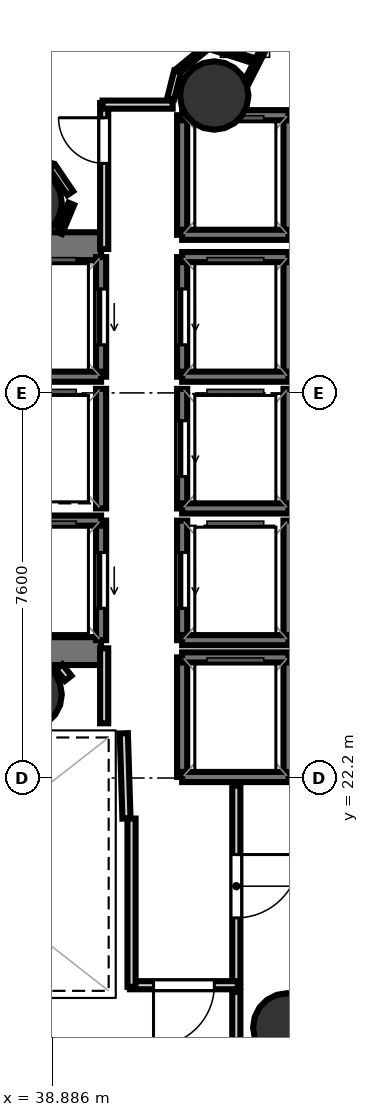
"""IFC4 building model, lengths in metres.
Left out: names, types, materials, properties, quantities, classifications, styles, units other than length and angle.
Written with IfcOpenShell. Run it as: python <this file> out.ifc"""

import sys

from ifc_helpers import new_model, si_unit, direction, frame, frame_2d, origin, origin_2d, place, context, subcontext, project, spatial, rectangle, hollow_circle, extrude, element, fill, save


model = new_model("IFC4")
c1 = context("Model", 3, precision=1e-05, world=origin(), true_north=direction((0.0, 1.0)))
c2 = subcontext(c1, "Body", "Model", "MODEL_VIEW")
j1 = project(units=[si_unit("LENGTHUNIT", "METRE"), si_unit("PLANEANGLEUNIT", "RADIAN")], contexts=[c1])
p1 = place(None, origin())
s1 = spatial("IfcSite", under=j1, at=p1, CompositionType="ELEMENT")
p2 = place(p1, origin())
s2 = spatial("IfcBuilding", under=s1, at=p2, CompositionType="ELEMENT")
p3 = place(p2, frame((0.0, 0.0, 173.5)))
s3 = spatial("IfcBuildingStorey", under=s2, at=p3, CompositionType="ELEMENT", Elevation=173.5)
p4 = place(p3, frame((29.23, 32.695, 0.0), z_axis=(0.0, 0.0, 1.0), x_axis=(1.0, 0.0, 0.0)))
e1 = element("IfcWall", 1, at=p4, inside=s3, PredefinedType="SHEAR", context=c2, shape_type="SweptSolid", body=[
    extrude(rectangle(XDim=10.62, YDim=0.55, at=frame_2d((5.31, 0.0))), origin(), (0.0, 0.0, 1.0), 3.52),
])
p5 = place(p4, frame((0.995, 0.0, 0.0)))
e2 = element("IfcOpeningElement", 2, at=p5, cuts=e1, PredefinedType="OPENING", context=c2, shape_type="SweptSolid", body=[
    extrude(rectangle(XDim=1.25, YDim=2.15, at=frame_2d((0.625, 1.075))), frame((0.0, 0.285, 0.0), z_axis=(0.0, -1.0, 0.0), x_axis=(1.0, 0.0, 0.0)), (0.0, 0.0, 1.0), 0.57),
])
p6 = place(p3, frame((29.23, 24.705, 0.0), z_axis=(0.0, 0.0, 1.0), x_axis=(1.0, 0.0, 0.0)))
e3 = element("IfcWall", 3, at=p6, inside=s3, PredefinedType="SHEAR", context=c2, shape_type="SweptSolid", body=[
    extrude(rectangle(XDim=10.62, YDim=0.55, at=frame_2d((5.31, 0.0))), origin(), (0.0, 0.0, 1.0), 3.52),
])
p7 = place(p6, frame((0.795, 0.0, 0.0)))
e4 = element("IfcOpeningElement", 4, at=p7, cuts=e3, PredefinedType="OPENING", context=c2, shape_type="SweptSolid", body=[
    extrude(rectangle(XDim=1.25, YDim=2.15, at=frame_2d((0.625, 1.075))), frame((0.0, 0.285, 0.0), z_axis=(0.0, -1.0, 0.0), x_axis=(1.0, 0.0, 0.0)), (0.0, 0.0, 1.0), 0.57),
])
for number, where, z_axis, x_axis in (
    (5, (38.4, 33.55, 0.0), (0.0, 0.0, 1.0), (1.0, 0.0, 0.0)),
    (6, (38.4, 23.85, 0.0), (0.0, 0.0, 1.0), (1.0, 0.0, 0.0)),
    (7, (42.083, 35.669, 0.0), (0.0, 0.0, 1.0), (1.0, 0.0, 0.0)),
    (8, (43.525, 17.279, 0.0), (0.0, 0.0, 1.0), (1.0, 0.0, 0.0)),
):
    element("IfcColumn", number, at=place(p3, frame(where, z_axis=z_axis, x_axis=x_axis)), inside=s3, PredefinedType="COLUMN", context=c2, shape_type="SweptSolid", body=[
        extrude(hollow_circle(Radius=0.675, WallThickness=0.032, at=origin_2d()), origin(), (0.0, 0.0, 1.0), 3.7),
    ])
p8 = place(p3, frame((39.85, 30.12, 0.0), z_axis=(0.0, 0.0, 1.0), x_axis=(0.0, 1.0, 0.0)))
e9 = element("IfcWall", 9, at=p8, inside=s3, PredefinedType="SOLIDWALL", context=c2, shape_type="SweptSolid", body=[
    extrude(rectangle(XDim=2.36, YDim=0.2, at=frame_2d((1.18, 0.0))), origin(), (0.0, 0.0, 1.0), 3.52),
])
p9 = place(p8, frame((0.63, 0.0, 0.0)))
e10 = element("IfcOpeningElement", 10, at=p9, cuts=e9, PredefinedType="OPENING", context=c2, shape_type="SweptSolid", body=[
    extrude(rectangle(XDim=1.1, YDim=2.15, at=frame_2d((0.55, 1.075))), frame((0.0, 0.11, 0.0), z_axis=(0.0, -1.0, 0.0), x_axis=(1.0, 0.0, 0.0)), (0.0, 0.0, 1.0), 0.22),
])
p10 = place(p3, frame((37.75, 30.12, 0.0), z_axis=(0.0, 0.0, 1.0), x_axis=(1.0, 0.0, 0.0)))
e11 = element("IfcWall", 11, at=p10, inside=s3, PredefinedType="SOLIDWALL", context=c2, shape_type="SweptSolid", body=[
    extrude(rectangle(XDim=2.1, YDim=0.2, at=frame_2d((1.05, 0.0))), origin(), (0.0, 0.0, 1.0), 3.52),
])
p11 = place(p3, frame((39.85, 24.92, 0.0), z_axis=(0.0, 0.0, 1.0), x_axis=(0.0, 1.0, 0.0)))
e12 = element("IfcWall", 12, at=p11, inside=s3, PredefinedType="SOLIDWALL", context=c2, shape_type="SweptSolid", body=[
    extrude(rectangle(XDim=2.36, YDim=0.2, at=frame_2d((1.18, 0.0))), origin(), (0.0, 0.0, 1.0), 3.52),
])
p12 = place(p11, frame((0.63, 0.0, 0.0)))
e13 = element("IfcOpeningElement", 13, at=p12, cuts=e12, PredefinedType="OPENING", context=c2, shape_type="SweptSolid", body=[
    extrude(rectangle(XDim=1.1, YDim=2.15, at=frame_2d((0.55, 1.075))), frame((0.0, 0.11, 0.0), z_axis=(0.0, -1.0, 0.0), x_axis=(1.0, 0.0, 0.0)), (0.0, 0.0, 1.0), 0.22),
])
p13 = place(p3, frame((37.75, 27.28, 0.0), z_axis=(0.0, 0.0, 1.0), x_axis=(1.0, 0.0, 0.0)))
e14 = element("IfcWall", 14, at=p13, inside=s3, PredefinedType="SOLIDWALL", context=c2, shape_type="SweptSolid", body=[
    extrude(rectangle(XDim=2.1, YDim=0.2, at=frame_2d((1.05, 0.0))), origin(), (0.0, 0.0, 1.0), 3.52),
])
p14 = place(p3, frame((43.55, 30.12, 0.0), z_axis=(0.0, 0.0, 1.0), x_axis=(0.0, 1.0, 0.0)))
e15 = element("IfcWall", 15, at=p14, inside=s3, PredefinedType="SOLIDWALL", context=c2, shape_type="SweptSolid", body=[
    extrude(rectangle(XDim=2.36, YDim=0.2, at=frame_2d((1.18, 0.0))), origin(), (0.0, 0.0, 1.0), 3.52),
])
p15 = place(p3, frame((41.45, 30.12, 0.0), z_axis=(0.0, 0.0, 1.0), x_axis=(0.0, 1.0, 0.0)))
e16 = element("IfcWall", 16, at=p15, inside=s3, PredefinedType="SOLIDWALL", context=c2, shape_type="SweptSolid", body=[
    extrude(rectangle(XDim=2.36, YDim=0.2, at=frame_2d((1.18, 0.0))), origin(), (0.0, 0.0, 1.0), 3.52),
])
p16 = place(p15, frame((0.63, 0.0, 0.0)))
e17 = element("IfcOpeningElement", 17, at=p16, cuts=e16, PredefinedType="OPENING", context=c2, shape_type="SweptSolid", body=[
    extrude(rectangle(XDim=1.1, YDim=2.15, at=frame_2d((0.55, 1.075))), frame((0.0, 0.11, 0.0), z_axis=(0.0, -1.0, 0.0), x_axis=(1.0, 0.0, 0.0)), (0.0, 0.0, 1.0), 0.22),
])
for number, where, z_axis, x_axis in (
    (18, (41.45, 32.48, 0.0), (0.0, 0.0, 1.0), (1.0, 0.0, 0.0)),
    (19, (41.45, 30.12, 0.0), (0.0, 0.0, 1.0), (1.0, 0.0, 0.0)),
):
    element("IfcWall", number, at=place(p3, frame(where, z_axis=z_axis, x_axis=x_axis)), inside=s3, PredefinedType="SOLIDWALL", context=c2, shape_type="SweptSolid", body=[
        extrude(rectangle(XDim=2.1, YDim=0.2, at=frame_2d((1.05, 0.0))), origin(), (0.0, 0.0, 1.0), 3.52),
    ])
p17 = place(p3, frame((43.55, 27.52, 0.0), z_axis=(0.0, 0.0, 1.0), x_axis=(0.0, 1.0, 0.0)))
e20 = element("IfcWall", 20, at=p17, inside=s3, PredefinedType="SOLIDWALL", context=c2, shape_type="SweptSolid", body=[
    extrude(rectangle(XDim=2.36, YDim=0.2, at=frame_2d((1.18, 0.0))), origin(), (0.0, 0.0, 1.0), 3.52),
])
p18 = place(p3, frame((41.45, 27.52, 0.0), z_axis=(0.0, 0.0, 1.0), x_axis=(0.0, 1.0, 0.0)))
e21 = element("IfcWall", 21, at=p18, inside=s3, PredefinedType="SOLIDWALL", context=c2, shape_type="SweptSolid", body=[
    extrude(rectangle(XDim=2.36, YDim=0.2, at=frame_2d((1.18, 0.0))), origin(), (0.0, 0.0, 1.0), 3.52),
])
p19 = place(p18, frame((0.63, 0.0, 0.0)))
e22 = element("IfcOpeningElement", 22, at=p19, cuts=e21, PredefinedType="OPENING", context=c2, shape_type="SweptSolid", body=[
    extrude(rectangle(XDim=1.1, YDim=2.15, at=frame_2d((0.55, 1.075))), frame((0.0, 0.11, 0.0), z_axis=(0.0, -1.0, 0.0), x_axis=(1.0, 0.0, 0.0)), (0.0, 0.0, 1.0), 0.22),
])
p20 = place(p3, frame((41.45, 27.52, 0.0), z_axis=(0.0, 0.0, 1.0), x_axis=(1.0, 0.0, 0.0)))
e23 = element("IfcWall", 23, at=p20, inside=s3, PredefinedType="SOLIDWALL", context=c2, shape_type="SweptSolid", body=[
    extrude(rectangle(XDim=2.1, YDim=0.2, at=frame_2d((1.05, 0.0))), origin(), (0.0, 0.0, 1.0), 3.52),
])
p21 = place(p3, frame((43.55, 24.92, 0.0), z_axis=(0.0, 0.0, 1.0), x_axis=(0.0, 1.0, 0.0)))
e24 = element("IfcWall", 24, at=p21, inside=s3, PredefinedType="SOLIDWALL", context=c2, shape_type="SweptSolid", body=[
    extrude(rectangle(XDim=2.36, YDim=0.2, at=frame_2d((1.18, 0.0))), origin(), (0.0, 0.0, 1.0), 3.52),
])
p22 = place(p3, frame((41.45, 24.92, 0.0), z_axis=(0.0, 0.0, 1.0), x_axis=(0.0, 1.0, 0.0)))
e25 = element("IfcWall", 25, at=p22, inside=s3, PredefinedType="SOLIDWALL", context=c2, shape_type="SweptSolid", body=[
    extrude(rectangle(XDim=2.36, YDim=0.2, at=frame_2d((1.18, 0.0))), origin(), (0.0, 0.0, 1.0), 3.52),
])
p23 = place(p22, frame((0.63, 0.0, 0.0)))
e26 = element("IfcOpeningElement", 26, at=p23, cuts=e25, PredefinedType="OPENING", context=c2, shape_type="SweptSolid", body=[
    extrude(rectangle(XDim=1.1, YDim=2.15, at=frame_2d((0.55, 1.075))), frame((0.0, 0.11, 0.0), z_axis=(0.0, -1.0, 0.0), x_axis=(1.0, 0.0, 0.0)), (0.0, 0.0, 1.0), 0.22),
])
p24 = place(p3, frame((41.45, 24.92, 0.0), z_axis=(0.0, 0.0, 1.0), x_axis=(1.0, 0.0, 0.0)))
e27 = element("IfcWall", 27, at=p24, inside=s3, PredefinedType="SOLIDWALL", context=c2, shape_type="SweptSolid", body=[
    extrude(rectangle(XDim=2.1, YDim=0.2, at=frame_2d((1.05, 0.0))), origin(), (0.0, 0.0, 1.0), 3.52),
])
p25 = place(p3, frame((39.85, 27.52, 0.0), z_axis=(0.0, 0.0, 1.0), x_axis=(0.0, 1.0, 0.0)))
e28 = element("IfcWall", 28, at=p25, inside=s3, PredefinedType="SOLIDWALL", context=c2, shape_type="SweptSolid", body=[
    extrude(rectangle(XDim=2.36, YDim=0.2, at=frame_2d((1.18, 0.0))), origin(), (0.0, 0.0, 1.0), 3.52),
])
for number, where, z_axis, x_axis in (
    (29, (43.55, 22.22, 0.0), (0.0, 0.0, 1.0), (0.0, 1.0, 0.0)),
    (30, (41.45, 22.22, 0.0), (0.0, 0.0, 1.0), (0.0, 1.0, 0.0)),
):
    element("IfcWall", number, at=place(p3, frame(where, z_axis=z_axis, x_axis=x_axis)), inside=s3, PredefinedType="SOLIDWALL", context=c2, shape_type="SweptSolid", body=[
        extrude(rectangle(XDim=2.36, YDim=0.2, at=frame_2d((1.18, 0.0))), origin(), (0.0, 0.0, 1.0), 3.52),
    ])
for number, where, z_axis, x_axis in (
    (31, (41.45, 24.58, 0.0), (0.0, 0.0, 1.0), (1.0, 0.0, 0.0)),
    (32, (41.45, 22.22, 0.0), (0.0, 0.0, 1.0), (1.0, 0.0, 0.0)),
):
    element("IfcWall", number, at=place(p3, frame(where, z_axis=z_axis, x_axis=x_axis)), inside=s3, PredefinedType="SOLIDWALL", context=c2, shape_type="SweptSolid", body=[
        extrude(rectangle(XDim=2.1, YDim=0.2, at=frame_2d((1.05, 0.0))), origin(), (0.0, 0.0, 1.0), 3.52),
    ])
for number, where, z_axis, x_axis in (
    (33, (43.55, 32.92, 0.0), (0.0, 0.0, 1.0), (0.0, 1.0, 0.0)),
    (34, (41.45, 32.92, 0.0), (0.0, 0.0, 1.0), (0.0, 1.0, 0.0)),
):
    element("IfcWall", number, at=place(p3, frame(where, z_axis=z_axis, x_axis=x_axis)), inside=s3, PredefinedType="SOLIDWALL", context=c2, shape_type="SweptSolid", body=[
        extrude(rectangle(XDim=2.36, YDim=0.2, at=frame_2d((1.18, 0.0))), origin(), (0.0, 0.0, 1.0), 3.52),
    ])
for number, where, z_axis, x_axis in (
    (35, (41.45, 35.28, 0.0), (0.0, 0.0, 1.0), (1.0, 0.0, 0.0)),
    (36, (41.45, 32.92, 0.0), (0.0, 0.0, 1.0), (1.0, 0.0, 0.0)),
):
    element("IfcWall", number, at=place(p3, frame(where, z_axis=z_axis, x_axis=x_axis)), inside=s3, PredefinedType="SOLIDWALL", context=c2, shape_type="SweptSolid", body=[
        extrude(rectangle(XDim=2.1, YDim=0.2, at=frame_2d((1.05, 0.0))), origin(), (0.0, 0.0, 1.0), 3.52),
    ])
p26 = place(p3, frame((40.351, 21.401, 0.0), z_axis=(0.0, 0.0, 1.0), x_axis=(-0.031058045979, 0.999517582527, 0.0)))
e37 = element("IfcWall", 37, at=p26, inside=s3, PredefinedType="PARTITIONING", context=c2, shape_type="SweptSolid", body=[
    extrude(rectangle(XDim=1.682, YDim=0.16, at=frame_2d((0.841, 0.0))), origin(), (0.0, 0.0, 1.0), 2.84),
])
p27 = place(p3, frame((39.911, 23.28, 0.0), z_axis=(0.0, 0.0, 1.0), x_axis=(0.0, 1.0, 0.0)))
e38 = element("IfcWall", 38, at=p27, inside=s3, PredefinedType="PARTITIONING", context=c2, shape_type="SweptSolid", body=[
    extrude(rectangle(XDim=1.48, YDim=0.16, at=frame_2d((0.74, 0.0))), origin(), (0.0, 0.0, 1.0), 2.84),
])
p28 = place(p3, frame((39.911, 32.64, 0.0), z_axis=(0.0, 0.0, 1.0), x_axis=(0.0, 1.0, 0.0)))
e39 = element("IfcWall", 39, at=p28, inside=s3, PredefinedType="PARTITIONING", context=c2, shape_type="SweptSolid", body=[
    extrude(rectangle(XDim=2.88, YDim=0.16, at=frame_2d((1.44, 0.0))), origin(), (0.0, 0.0, 1.0), 2.84),
])
p29 = place(p28, frame((1.69, 0.0, 0.0)))
e40 = element("IfcOpeningElement", 40, at=p29, cuts=e39, PredefinedType="OPENING", context=c2, shape_type="SweptSolid", body=[
    extrude(rectangle(XDim=0.9, YDim=2.1, at=frame_2d((0.45, 1.05))), frame((0.0, 0.09, 0.0), z_axis=(0.0, -1.0, 0.0), x_axis=(1.0, 0.0, 0.0)), (0.0, 0.0, 1.0), 0.18),
])
p30 = place(p3, frame((39.88, 35.489, 0.0), z_axis=(0.0, 0.0, 1.0), x_axis=(1.0, 0.0, 0.0)))
e41 = element("IfcWall", 41, at=p30, inside=s3, PredefinedType="PARTITIONING", context=c2, shape_type="SweptSolid", body=[
    extrude(rectangle(XDim=1.383, YDim=0.16, at=frame_2d((0.691, 0.0))), origin(), (0.0, 0.0, 1.0), 2.84),
])
p31 = place(p3, frame((42.519, 22.05, 0.0), z_axis=(0.0, 0.0, 1.0), x_axis=(0.0, -1.0, 0.0)))
e42 = element("IfcWall", 42, at=p31, inside=s3, PredefinedType="PARTITIONING", context=c2, shape_type="SweptSolid", body=[
    extrude(rectangle(XDim=3.97, YDim=0.16, at=frame_2d((1.985, 0.0))), origin(), (0.0, 0.0, 1.0), 2.84),
])
p32 = place(p31, frame((1.36, 0.0, 0.0)))
e43 = element("IfcOpeningElement", 43, at=p32, cuts=e42, PredefinedType="OPENING", context=c2, shape_type="SweptSolid", body=[
    extrude(rectangle(XDim=1.25, YDim=2.2, at=frame_2d((0.625, 1.1))), frame((0.0, 0.09, 0.0), z_axis=(0.0, -1.0, 0.0), x_axis=(1.0, 0.0, 0.0)), (0.0, 0.0, 1.0), 0.18),
])
p33 = place(p3, frame((42.55, 18.111, 0.0), z_axis=(0.0, 0.0, 1.0), x_axis=(-1.0, 0.0, 0.0)))
e44 = element("IfcWall", 44, at=p33, inside=s3, PredefinedType="PARTITIONING", context=c2, shape_type="SweptSolid", body=[
    extrude(rectangle(XDim=2.13, YDim=0.16, at=frame_2d((1.065, 0.0))), origin(), (0.0, 0.0, 1.0), 2.84),
])
p34 = place(p33, frame((0.465, 0.0, 0.0)))
e45 = element("IfcOpeningElement", 45, at=p34, cuts=e44, PredefinedType="OPENING", context=c2, shape_type="SweptSolid", body=[
    extrude(rectangle(XDim=1.2, YDim=2.15, at=frame_2d((0.6, 1.075))), frame((0.0, 0.09, 0.0), z_axis=(0.0, -1.0, 0.0), x_axis=(1.0, 0.0, 0.0)), (0.0, 0.0, 1.0), 0.18),
])
p35 = place(p3, frame((40.451, 18.08, 0.0), z_axis=(0.0, 0.0, 1.0), x_axis=(0.0, 1.0, 0.0)))
e46 = element("IfcWall", 46, at=p35, inside=s3, PredefinedType="PARTITIONING", context=c2, shape_type="SweptSolid", body=[
    extrude(rectangle(XDim=3.32, YDim=0.16, at=frame_2d((1.66, 0.0))), origin(), (0.0, 0.0, 1.0), 2.84),
])
p36 = place(p3, frame((39.202, 24.169, 0.0), z_axis=(0.0, 0.0, 1.0), x_axis=(-0.621699046284, 0.783256213413, 0.0)))
e47 = element("IfcWall", 47, at=p36, inside=s3, PredefinedType="PARTITIONING", context=c2, shape_type="SweptSolid", body=[
    extrude(rectangle(XDim=0.289, YDim=0.16, at=frame_2d((0.144, 0.0))), origin(), (0.0, 0.0, 1.0), 2.84),
])
p37 = place(p3, frame((42.519, 17.98, 0.0), z_axis=(0.0, 0.0, 1.0), x_axis=(0.0, -1.0, 0.0)))
e48 = element("IfcWall", 48, at=p37, inside=s3, PredefinedType="PARTITIONING", context=c2, shape_type="SweptSolid", body=[
    extrude(rectangle(XDim=3.042, YDim=0.16, at=frame_2d((1.521, 0.0))), origin(), (0.0, 0.0, 1.0), 2.84),
])
p38 = place(p3, frame((42.462, 35.426, 0.0), z_axis=(0.0, 0.0, 1.0), x_axis=(0.454699955927, 0.890644682284, 0.0)))
e49 = element("IfcWall", 49, at=p38, inside=s3, PredefinedType="PARTITIONING", context=c2, shape_type="SweptSolid", body=[
    extrude(rectangle(XDim=1.601, YDim=0.105, at=frame_2d((0.801, 0.0))), origin(), (0.0, 0.0, 1.0), 2.84),
])
p39 = place(p3, frame((39.241, 33.741, 0.0), z_axis=(0.0, 0.0, 1.0), x_axis=(-0.559619584068, 0.828749613048, 0.0)))
e50 = element("IfcWall", 50, at=p39, inside=s3, PredefinedType="PARTITIONING", context=c2, shape_type="SweptSolid", body=[
    extrude(rectangle(XDim=0.629, YDim=0.14, at=frame_2d((0.314, 0.0))), origin(), (0.0, 0.0, 1.0), 2.84),
])
p40 = place(p3, frame((38.873, 34.274, 0.0), z_axis=(0.0, 0.0, 1.0), x_axis=(-0.956850575764, 0.290580411693, 0.0)))
e51 = element("IfcWall", 51, at=p40, inside=s3, PredefinedType="PARTITIONING", context=c2, shape_type="SweptSolid", body=[
    extrude(rectangle(XDim=0.485, YDim=0.12, at=frame_2d((0.242, 0.0))), origin(), (0.0, 0.0, 1.0), 2.84),
])
p41 = place(p3, frame((39.023, 32.958, 0.0), z_axis=(0.0, 0.0, 1.0), x_axis=(0.385702795868, 0.922623082987, 0.0)))
e52 = element("IfcWall", 52, at=p41, inside=s3, PredefinedType="PARTITIONING", context=c2, shape_type="SweptSolid", body=[
    extrude(rectangle(XDim=0.622, YDim=0.12, at=frame_2d((0.311, 0.0))), origin(), (0.0, 0.0, 1.0), 2.84),
])
p42 = place(p3, frame((37.22, 38.168, 0.0), z_axis=(0.0, 0.0, 1.0), x_axis=(0.952167427944, -0.305576813849, 0.0)))
e53 = element("IfcWall", 53, at=p42, inside=s3, PredefinedType="PARTITIONING", context=c2, shape_type="SweptSolid", body=[
    extrude(rectangle(XDim=5.904, YDim=0.105, at=frame_2d((2.952, 0.0))), origin(), (0.0, 0.0, 1.0), 2.84),
])
p43 = place(p3, frame((42.487, 37.074, 0.0), z_axis=(0.0, 0.0, 1.0), x_axis=(-0.773083984598, -0.634303675504, 0.0)))
e54 = element("IfcWall", 54, at=p43, inside=s3, PredefinedType="PARTITIONING", context=c2, shape_type="SweptSolid", body=[
    extrude(rectangle(XDim=1.446, YDim=0.105, at=frame_2d((0.723, 0.0))), origin(), (0.0, 0.0, 1.0), 2.84),
])
p44 = place(p3, frame((41.359, 36.14, 0.0), z_axis=(0.0, 0.0, 1.0), x_axis=(-0.243371504092, -0.969933147694, 0.0)))
e55 = element("IfcWall", 55, at=p44, inside=s3, PredefinedType="PARTITIONING", context=c2, shape_type="SweptSolid", body=[
    extrude(rectangle(XDim=0.55, YDim=0.14, at=frame_2d((0.275, 0.0))), origin(), (0.0, 0.0, 1.0), 2.84),
])
p45 = place(p9, origin())
e56 = element("IfcDoor", 56, at=p45, inside=s3, OperationType="SLIDING_TO_LEFT", PredefinedType="DOOR", context=c2, shape_type="SweptSolid", body=[
    extrude(rectangle(XDim=1.1, YDim=2.15, at=frame_2d((0.55, 1.075))), frame((0.0, 0.025, 0.0), z_axis=(0.0, -1.0, 0.0), x_axis=(1.0, 0.0, 0.0)), (0.0, 0.0, 1.0), 0.05),
])
fill(e10, e56)
p46 = place(p12, origin())
e57 = element("IfcDoor", 57, at=p46, inside=s3, OperationType="SLIDING_TO_LEFT", PredefinedType="DOOR", context=c2, shape_type="SweptSolid", body=[
    extrude(rectangle(XDim=1.1, YDim=2.15, at=frame_2d((0.55, 1.075))), frame((0.0, 0.025, 0.0), z_axis=(0.0, -1.0, 0.0), x_axis=(1.0, 0.0, 0.0)), (0.0, 0.0, 1.0), 0.05),
])
fill(e13, e57)
p47 = place(p16, origin())
e58 = element("IfcDoor", 58, at=p47, inside=s3, OperationType="SLIDING_TO_LEFT", PredefinedType="DOOR", context=c2, shape_type="SweptSolid", body=[
    extrude(rectangle(XDim=1.1, YDim=2.15, at=frame_2d((0.55, 1.075))), frame((0.0, 0.025, 0.0), z_axis=(0.0, -1.0, 0.0), x_axis=(1.0, 0.0, 0.0)), (0.0, 0.0, 1.0), 0.05),
])
fill(e17, e58)
p48 = place(p19, origin())
e59 = element("IfcDoor", 59, at=p48, inside=s3, OperationType="SLIDING_TO_LEFT", PredefinedType="DOOR", context=c2, shape_type="SweptSolid", body=[
    extrude(rectangle(XDim=1.1, YDim=2.15, at=frame_2d((0.55, 1.075))), frame((0.0, 0.025, 0.0), z_axis=(0.0, -1.0, 0.0), x_axis=(1.0, 0.0, 0.0)), (0.0, 0.0, 1.0), 0.05),
])
fill(e22, e59)
p49 = place(p23, origin())
e60 = element("IfcDoor", 60, at=p49, inside=s3, OperationType="SLIDING_TO_LEFT", PredefinedType="DOOR", context=c2, shape_type="SweptSolid", body=[
    extrude(rectangle(XDim=1.1, YDim=2.15, at=frame_2d((0.55, 1.075))), frame((0.0, 0.025, 0.0), z_axis=(0.0, -1.0, 0.0), x_axis=(1.0, 0.0, 0.0)), (0.0, 0.0, 1.0), 0.05),
])
fill(e26, e60)
p50 = place(p34, origin())
e61 = element("IfcDoor", 61, at=p50, inside=s3, OperationType="SINGLE_SWING_RIGHT", PredefinedType="DOOR", context=c2, shape_type="SweptSolid", body=[
    extrude(rectangle(XDim=1.2, YDim=2.15, at=frame_2d((0.6, 1.075))), frame((0.0, 0.025, 0.0), z_axis=(0.0, -1.0, 0.0), x_axis=(1.0, 0.0, 0.0)), (0.0, 0.0, 1.0), 0.05),
])
fill(e45, e61)
p51 = place(p32, origin())
e62 = element("IfcDoor", 62, at=p51, inside=s3, OperationType="SINGLE_SWING_LEFT", PredefinedType="DOOR", context=c2, shape_type="SweptSolid", body=[
    extrude(rectangle(XDim=1.25, YDim=2.2, at=frame_2d((0.625, 1.1))), frame((0.0, 0.025, 0.0), z_axis=(0.0, -1.0, 0.0), x_axis=(1.0, 0.0, 0.0)), (0.0, 0.0, 1.0), 0.05),
])
fill(e43, e62)
p52 = place(p29, origin())
e63 = element("IfcDoor", 63, at=p52, inside=s3, OperationType="SINGLE_SWING_RIGHT", PredefinedType="DOOR", context=c2, shape_type="SweptSolid", body=[
    extrude(rectangle(XDim=0.9, YDim=2.1, at=frame_2d((0.45, 1.05))), frame((0.0, 0.025, 0.0), z_axis=(0.0, -1.0, 0.0), x_axis=(1.0, 0.0, 0.0)), (0.0, 0.0, 1.0), 0.05),
])
fill(e40, e63)
save(model, sys.argv[1])
